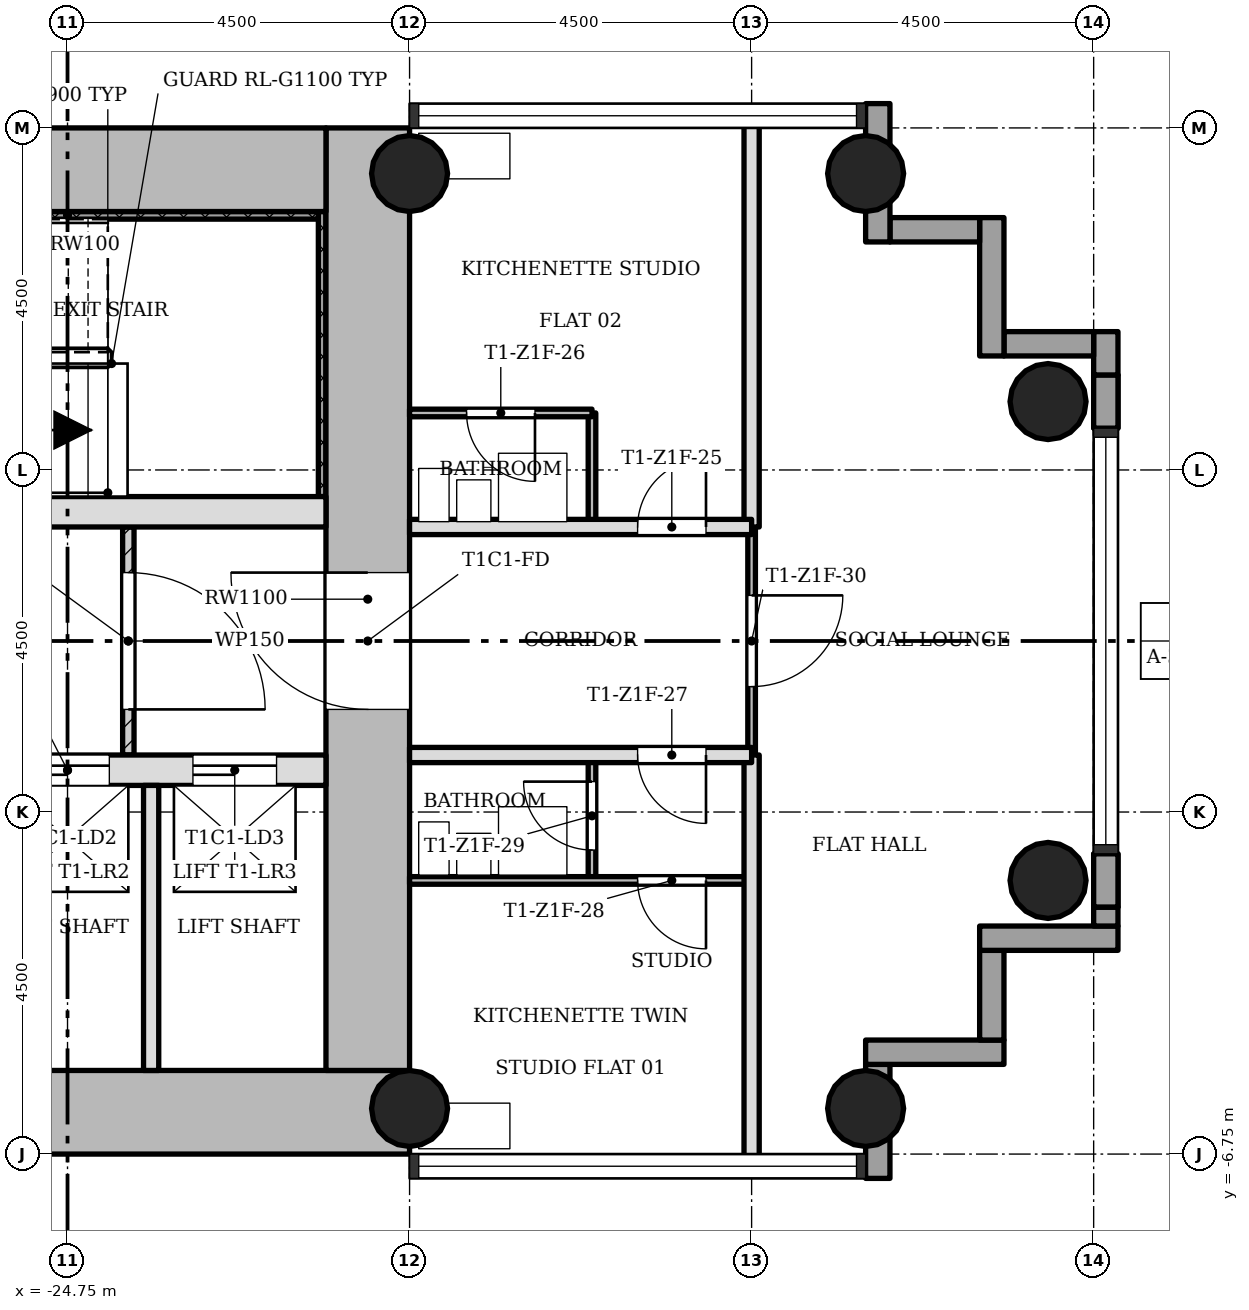
"""IFC4 building model, lengths in metres.
Left out: names, types, materials, properties, quantities, classifications, styles, units other than length and angle.
Written with IfcOpenShell. Run it as: python <this file> out.ifc"""

import sys

from ifc_helpers import new_model, si_unit, direction, frame, frame_2d, origin, origin_2d, place, context, subcontext, project, spatial, rectangle, hollow_circle, extrude, element, fill, save


model = new_model("IFC4")
c1 = context("Model", 3, precision=1e-05, world=origin(), true_north=direction((0.0, 1.0)))
c2 = subcontext(c1, "Body", "Model", "MODEL_VIEW")
j1 = project(units=[si_unit("LENGTHUNIT", "METRE"), si_unit("PLANEANGLEUNIT", "RADIAN")], contexts=[c1])
p1 = place(None, origin())
s1 = spatial("IfcSite", under=j1, at=p1, CompositionType="ELEMENT")
p2 = place(p1, origin())
s2 = spatial("IfcBuilding", under=s1, at=p2, CompositionType="ELEMENT")
p3 = place(p2, frame((0.0, 0.0, 68.7)))
s3 = spatial("IfcBuildingStorey", under=s2, at=p3, CompositionType="ELEMENT", Elevation=68.7)
p4 = place(p3, frame((-28.15, -6.2, 0.0), z_axis=(0.0, 0.0, 1.0), x_axis=(1.0, 0.0, 0.0)))
e1 = element("IfcWall", 1, at=p4, inside=s3, PredefinedType="SHEAR", context=c2, shape_type="SweptSolid", body=[
    extrude(rectangle(XDim=7.9, YDim=1.1, at=frame_2d((3.95, 0.0))), origin(), (0.0, 0.0, 1.0), 3.4),
])
p5 = place(p3, frame((-20.8, -5.65, 0.0), z_axis=(0.0, 0.0, 1.0), x_axis=(0.0, 1.0, 0.0)))
e2 = element("IfcWall", 2, at=p5, inside=s3, PredefinedType="SHEAR", context=c2, shape_type="SweptSolid", body=[
    extrude(rectangle(XDim=12.4, YDim=1.1, at=frame_2d((6.2, 0.0))), origin(), (0.0, 0.0, 1.0), 3.4),
])
p6 = place(p5, frame((4.75, 0.0, 0.0)))
e3 = element("IfcOpeningElement", 3, at=p6, cuts=e2, PredefinedType="OPENING", context=c2, shape_type="SweptSolid", body=[
    extrude(rectangle(XDim=1.8, YDim=2.1, at=frame_2d((0.9, 1.05))), frame((0.0, 0.56, 0.0), z_axis=(0.0, -1.0, 0.0), x_axis=(1.0, 0.0, 0.0)), (0.0, 0.0, 1.0), 1.12),
])
p7 = place(p3, frame((-21.35, 6.2, 0.0), z_axis=(0.0, 0.0, 1.0), x_axis=(-1.0, 0.0, 0.0)))
e4 = element("IfcWall", 4, at=p7, inside=s3, PredefinedType="SHEAR", context=c2, shape_type="SweptSolid", body=[
    extrude(rectangle(XDim=7.998, YDim=1.1, at=frame_2d((3.999, 0.0))), origin(), (0.0, 0.0, 1.0), 3.4),
])
p8 = place(p3, frame((-28.15, -1.7, 0.0), z_axis=(0.0, 0.0, 1.0), x_axis=(1.0, 0.0, 0.0)))
e5 = element("IfcWall", 5, at=p8, inside=s3, PredefinedType="SHEAR", context=c2, shape_type="SweptSolid", body=[
    extrude(rectangle(XDim=6.8, YDim=0.4, at=frame_2d((3.4, 0.0))), origin(), (0.0, 0.0, 1.0), 3.4),
])
p9 = place(p8, frame((0.65, 0.0, 0.0)))
e6 = element("IfcOpeningElement", 6, at=p9, cuts=e5, PredefinedType="OPENING", context=c2, shape_type="SweptSolid", body=[
    extrude(rectangle(XDim=1.1, YDim=2.1, at=frame_2d((0.55, 1.05))), frame((0.0, 0.21, 0.0), z_axis=(0.0, -1.0, 0.0), x_axis=(1.0, 0.0, 0.0)), (0.0, 0.0, 1.0), 0.42),
])
p10 = place(p8, frame((2.85, 0.0, 0.0)))
e7 = element("IfcOpeningElement", 7, at=p10, cuts=e5, PredefinedType="OPENING", context=c2, shape_type="SweptSolid", body=[
    extrude(rectangle(XDim=1.1, YDim=2.1, at=frame_2d((0.55, 1.05))), frame((0.0, 0.21, 0.0), z_axis=(0.0, -1.0, 0.0), x_axis=(1.0, 0.0, 0.0)), (0.0, 0.0, 1.0), 0.42),
])
p11 = place(p8, frame((5.05, 0.0, 0.0)))
e8 = element("IfcOpeningElement", 8, at=p11, cuts=e5, PredefinedType="OPENING", context=c2, shape_type="SweptSolid", body=[
    extrude(rectangle(XDim=1.1, YDim=2.1, at=frame_2d((0.55, 1.05))), frame((0.0, 0.21, 0.0), z_axis=(0.0, -1.0, 0.0), x_axis=(1.0, 0.0, 0.0)), (0.0, 0.0, 1.0), 0.42),
])
p12 = place(p3, frame((-28.15, 1.7, 0.0), z_axis=(0.0, 0.0, 1.0), x_axis=(1.0, 0.0, 0.0)))
e9 = element("IfcWall", 9, at=p12, inside=s3, PredefinedType="SHEAR", context=c2, shape_type="SweptSolid", body=[
    extrude(rectangle(XDim=6.8, YDim=0.4, at=frame_2d((3.4, 0.0))), origin(), (0.0, 0.0, 1.0), 3.4),
])
p13 = place(p12, frame((0.55, 0.0, 0.0)))
e10 = element("IfcOpeningElement", 10, at=p13, cuts=e9, PredefinedType="OPENING", context=c2, shape_type="SweptSolid", body=[
    extrude(rectangle(XDim=0.9, YDim=2.1, at=frame_2d((0.45, 1.05))), frame((0.0, 0.21, 0.0), z_axis=(0.0, -1.0, 0.0), x_axis=(1.0, 0.0, 0.0)), (0.0, 0.0, 1.0), 0.42),
])
for number, where, z_axis, x_axis in (
    (11, (-20.25, -6.15, 0.0), (0.0, 0.0, 1.0), (1.0, 0.0, 0.0)),
    (12, (-20.25, 6.15, 0.0), (0.0, 0.0, 1.0), (1.0, 0.0, 0.0)),
    (13, (-14.25, -6.15, 0.0), (0.0, 0.0, 1.0), (1.0, 0.0, 0.0)),
    (14, (-14.25, 6.15, 0.0), (0.0, 0.0, 1.0), (1.0, 0.0, 0.0)),
    (15, (-11.85, -3.15, 0.0), (0.0, 0.0, 1.0), (1.0, 0.0, 0.0)),
    (16, (-11.85, 3.15, 0.0), (0.0, 0.0, 1.0), (1.0, 0.0, 0.0)),
):
    element("IfcColumn", number, at=place(p3, frame(where, z_axis=z_axis, x_axis=x_axis)), inside=s3, PredefinedType="COLUMN", context=c2, shape_type="SweptSolid", body=[
        extrude(hollow_circle(Radius=0.5, WallThickness=0.036, at=origin_2d()), origin(), (0.0, 0.0, 1.0), 3.4),
    ])
p14 = place(p3, frame((-14.09, -7.07, -0.3), z_axis=(0.0, 0.0, 1.0), x_axis=(0.0, 1.0, 0.0)))
e17 = element("IfcWall", 17, at=p14, inside=s3, PredefinedType="STANDARD", context=c2, shape_type="SweptSolid", body=[
    extrude(rectangle(XDim=1.5, YDim=0.32, at=frame_2d((0.75, 0.0))), origin(), (0.0, 0.0, 1.0), 3.4),
])
p15 = place(p3, frame((-14.25, -5.41, -0.3), z_axis=(0.0, 0.0, 1.0), x_axis=(1.0, 0.0, 0.0)))
e18 = element("IfcWall", 18, at=p15, inside=s3, PredefinedType="STANDARD", context=c2, shape_type="SweptSolid", body=[
    extrude(rectangle(XDim=1.82, YDim=0.32, at=frame_2d((0.91, 0.0))), origin(), (0.0, 0.0, 1.0), 3.4),
])
p16 = place(p3, frame((-12.59, -5.25, -0.3), z_axis=(0.0, 0.0, 1.0), x_axis=(0.0, 1.0, 0.0)))
e19 = element("IfcWall", 19, at=p16, inside=s3, PredefinedType="STANDARD", context=c2, shape_type="SweptSolid", body=[
    extrude(rectangle(XDim=1.18, YDim=0.32, at=frame_2d((0.59, 0.0))), origin(), (0.0, 0.0, 1.0), 3.4),
])
p17 = place(p3, frame((-12.75, -3.91, -0.3), z_axis=(0.0, 0.0, 1.0), x_axis=(1.0, 0.0, 0.0)))
e20 = element("IfcWall", 20, at=p17, inside=s3, PredefinedType="STANDARD", context=c2, shape_type="SweptSolid", body=[
    extrude(rectangle(XDim=1.82, YDim=0.32, at=frame_2d((0.91, 0.0))), origin(), (0.0, 0.0, 1.0), 3.4),
])
p18 = place(p3, frame((-11.09, -3.75, 0.0), z_axis=(0.0, 0.0, 1.0), x_axis=(0.0, 1.0, 0.0)))
e21 = element("IfcWall", 21, at=p18, inside=s3, PredefinedType="STANDARD", context=c2, shape_type="SweptSolid", body=[
    extrude(rectangle(XDim=0.25, YDim=0.32, at=frame_2d((0.125, 0.0))), origin(), (0.0, 0.0, 1.0), 3.1),
])
p19 = place(p3, frame((-11.09, -3.5, 0.0), z_axis=(0.0, 0.0, 1.0), x_axis=(0.0, 1.0, 0.0)))
e22 = element("IfcWall", 22, at=p19, inside=s3, PredefinedType="STANDARD", context=c2, shape_type="SweptSolid", body=[
    extrude(rectangle(XDim=0.7, YDim=0.32, at=frame_2d((0.35, 0.0))), origin(), (0.0, 0.0, 1.0), 2.51),
])
p20 = place(p3, frame((-11.09, -3.5, 2.98), z_axis=(0.0, 0.0, 1.0), x_axis=(0.0, 1.0, 0.0)))
e23 = element("IfcWall", 23, at=p20, inside=s3, PredefinedType="STANDARD", context=c2, shape_type="SweptSolid", body=[
    extrude(rectangle(XDim=0.7, YDim=0.32, at=frame_2d((0.35, 0.0))), origin(), (0.0, 0.0, 1.0), 0.12),
])
p21 = place(p3, frame((-11.09, 2.8, 0.0), z_axis=(0.0, 0.0, 1.0), x_axis=(0.0, 1.0, 0.0)))
e24 = element("IfcWall", 24, at=p21, inside=s3, PredefinedType="STANDARD", context=c2, shape_type="SweptSolid", body=[
    extrude(rectangle(XDim=0.7, YDim=0.32, at=frame_2d((0.35, 0.0))), origin(), (0.0, 0.0, 1.0), 2.51),
])
p22 = place(p3, frame((-11.09, 2.8, 2.98), z_axis=(0.0, 0.0, 1.0), x_axis=(0.0, 1.0, 0.0)))
e25 = element("IfcWall", 25, at=p22, inside=s3, PredefinedType="STANDARD", context=c2, shape_type="SweptSolid", body=[
    extrude(rectangle(XDim=0.7, YDim=0.32, at=frame_2d((0.35, 0.0))), origin(), (0.0, 0.0, 1.0), 0.12),
])
p23 = place(p3, frame((-11.09, 3.5, 0.0), z_axis=(0.0, 0.0, 1.0), x_axis=(0.0, 1.0, 0.0)))
e26 = element("IfcWall", 26, at=p23, inside=s3, PredefinedType="STANDARD", context=c2, shape_type="SweptSolid", body=[
    extrude(rectangle(XDim=0.57, YDim=0.32, at=frame_2d((0.285, 0.0))), origin(), (0.0, 0.0, 1.0), 3.1),
])
p24 = place(p3, frame((-11.25, 3.91, -0.3), z_axis=(0.0, 0.0, 1.0), x_axis=(-1.0, 0.0, 0.0)))
e27 = element("IfcWall", 27, at=p24, inside=s3, PredefinedType="STANDARD", context=c2, shape_type="SweptSolid", body=[
    extrude(rectangle(XDim=1.18, YDim=0.32, at=frame_2d((0.59, 0.0))), origin(), (0.0, 0.0, 1.0), 3.4),
])
p25 = place(p3, frame((-12.59, 3.75, -0.3), z_axis=(0.0, 0.0, 1.0), x_axis=(0.0, 1.0, 0.0)))
e28 = element("IfcWall", 28, at=p25, inside=s3, PredefinedType="STANDARD", context=c2, shape_type="SweptSolid", body=[
    extrude(rectangle(XDim=1.82, YDim=0.32, at=frame_2d((0.91, 0.0))), origin(), (0.0, 0.0, 1.0), 3.4),
])
p26 = place(p3, frame((-12.75, 5.41, -0.3), z_axis=(0.0, 0.0, 1.0), x_axis=(-1.0, 0.0, 0.0)))
e29 = element("IfcWall", 29, at=p26, inside=s3, PredefinedType="STANDARD", context=c2, shape_type="SweptSolid", body=[
    extrude(rectangle(XDim=1.18, YDim=0.32, at=frame_2d((0.59, 0.0))), origin(), (0.0, 0.0, 1.0), 3.4),
])
p27 = place(p3, frame((-14.09, 5.25, -0.3), z_axis=(0.0, 0.0, 1.0), x_axis=(0.0, 1.0, 0.0)))
e30 = element("IfcWall", 30, at=p27, inside=s3, PredefinedType="STANDARD", context=c2, shape_type="SweptSolid", body=[
    extrude(rectangle(XDim=1.82, YDim=0.32, at=frame_2d((0.91, 0.0))), origin(), (0.0, 0.0, 1.0), 3.4),
])
p28 = place(p3, frame((-23.95, -1.5, 0.0), z_axis=(0.0, 0.0, 1.0), x_axis=(0.0, 1.0, 0.0)))
e31 = element("IfcWall", 31, at=p28, inside=s3, PredefinedType="PARTITIONING", context=c2, shape_type="SweptSolid", body=[
    extrude(rectangle(XDim=3.0, YDim=0.15, at=frame_2d((1.5, 0.0))), origin(), (0.0, 0.0, 1.0), 3.0),
])
p29 = place(p28, frame((0.6, 0.0, 0.0)))
e32 = element("IfcOpeningElement", 32, at=p29, cuts=e31, PredefinedType="OPENING", context=c2, shape_type="SweptSolid", body=[
    extrude(rectangle(XDim=1.8, YDim=2.1, at=frame_2d((0.9, 1.05))), frame((0.0, 0.085, 0.0), z_axis=(0.0, -1.0, 0.0), x_axis=(1.0, 0.0, 0.0)), (0.0, 0.0, 1.0), 0.17),
])
p30 = place(p3, frame((-23.65, -5.65, 0.0), z_axis=(0.0, 0.0, 1.0), x_axis=(0.0, 1.0, 0.0)))
e33 = element("IfcWall", 33, at=p30, inside=s3, PredefinedType="SOLIDWALL", context=c2, shape_type="SweptSolid", body=[
    extrude(rectangle(XDim=3.75, YDim=0.2, at=frame_2d((1.875, 0.0))), origin(), (0.0, 0.0, 1.0), 3.0),
])
p31 = place(p3, frame((-17.85, -3.15, 0.0), z_axis=(0.0, 0.0, 1.0), x_axis=(0.0, 1.0, 0.0)))
e34 = element("IfcWall", 34, at=p31, inside=s3, PredefinedType="PARTITIONING", context=c2, shape_type="SweptSolid", body=[
    extrude(rectangle(XDim=1.65, YDim=0.1, at=frame_2d((0.825, 0.0))), origin(), (0.0, 0.0, 1.0), 3.0),
])
p32 = place(p31, frame((0.4, 0.0, 0.0)))
e35 = element("IfcOpeningElement", 35, at=p32, cuts=e34, PredefinedType="OPENING", context=c2, shape_type="SweptSolid", body=[
    extrude(rectangle(XDim=0.9, YDim=2.1, at=frame_2d((0.45, 1.05))), frame((0.0, 0.06, 0.0), z_axis=(0.0, -1.0, 0.0), x_axis=(1.0, 0.0, 0.0)), (0.0, 0.0, 1.0), 0.12),
])
p33 = place(p3, frame((-17.85, 1.5, 0.0), z_axis=(0.0, 0.0, 1.0), x_axis=(0.0, 1.0, 0.0)))
e36 = element("IfcWall", 36, at=p33, inside=s3, PredefinedType="PARTITIONING", context=c2, shape_type="SweptSolid", body=[
    extrude(rectangle(XDim=1.5, YDim=0.1, at=frame_2d((0.75, 0.0))), origin(), (0.0, 0.0, 1.0), 3.0),
])
p34 = place(p3, frame((-15.75, -1.5, 0.0), z_axis=(0.0, 0.0, 1.0), x_axis=(0.0, 1.0, 0.0)))
e37 = element("IfcWall", 37, at=p34, inside=s3, PredefinedType="PARTITIONING", context=c2, shape_type="SweptSolid", body=[
    extrude(rectangle(XDim=3.0, YDim=0.1, at=frame_2d((1.5, 0.0))), origin(), (0.0, 0.0, 1.0), 3.0),
])
p35 = place(p34, frame((0.9, 0.0, 0.0)))
e38 = element("IfcOpeningElement", 38, at=p35, cuts=e37, PredefinedType="OPENING", context=c2, shape_type="SweptSolid", body=[
    extrude(rectangle(XDim=1.2, YDim=2.1, at=frame_2d((0.6, 1.05))), frame((0.0, 0.06, 0.0), z_axis=(0.0, -1.0, 0.0), x_axis=(1.0, 0.0, 0.0)), (0.0, 0.0, 1.0), 0.12),
])
for number, where, z_axis, x_axis in (
    (39, (-15.75, -6.85, 0.0), (0.0, 0.0, 1.0), (0.0, 1.0, 0.0)),
    (40, (-15.75, 1.5, 0.0), (0.0, 0.0, 1.0), (0.0, 1.0, 0.0)),
):
    element("IfcWall", number, at=place(p3, frame(where, z_axis=z_axis, x_axis=x_axis)), inside=s3, PredefinedType="SOLIDWALL", context=c2, shape_type="SweptSolid", body=[
        extrude(rectangle(XDim=5.35, YDim=0.2, at=frame_2d((2.675, 0.0))), origin(), (0.0, 0.0, 1.0), 3.0),
    ])
p36 = place(p3, frame((-20.25, -3.15, 0.0), z_axis=(0.0, 0.0, 1.0), x_axis=(1.0, 0.0, 0.0)))
e41 = element("IfcWall", 41, at=p36, inside=s3, PredefinedType="PARTITIONING", context=c2, shape_type="SweptSolid", body=[
    extrude(rectangle(XDim=4.5, YDim=0.1, at=frame_2d((2.25, 0.0))), origin(), (0.0, 0.0, 1.0), 3.0),
])
p37 = place(p36, frame((3.0, 0.0, 0.0)))
e42 = element("IfcOpeningElement", 42, at=p37, cuts=e41, PredefinedType="OPENING", context=c2, shape_type="SweptSolid", body=[
    extrude(rectangle(XDim=0.9, YDim=2.1, at=frame_2d((0.45, 1.05))), frame((0.0, 0.06, 0.0), z_axis=(0.0, -1.0, 0.0), x_axis=(1.0, 0.0, 0.0)), (0.0, 0.0, 1.0), 0.12),
])
p38 = place(p3, frame((-20.25, -1.5, 0.0), z_axis=(0.0, 0.0, 1.0), x_axis=(1.0, 0.0, 0.0)))
e43 = element("IfcWall", 43, at=p38, inside=s3, PredefinedType="SOLIDWALL", context=c2, shape_type="SweptSolid", body=[
    extrude(rectangle(XDim=4.5, YDim=0.2, at=frame_2d((2.25, 0.0))), origin(), (0.0, 0.0, 1.0), 3.0),
])
p39 = place(p38, frame((3.0, 0.0, 0.0)))
e44 = element("IfcOpeningElement", 44, at=p39, cuts=e43, PredefinedType="OPENING", context=c2, shape_type="SweptSolid", body=[
    extrude(rectangle(XDim=0.9, YDim=2.1, at=frame_2d((0.45, 1.05))), frame((0.0, 0.11, 0.0), z_axis=(0.0, -1.0, 0.0), x_axis=(1.0, 0.0, 0.0)), (0.0, 0.0, 1.0), 0.22),
])
p40 = place(p3, frame((-20.25, 1.5, 0.0), z_axis=(0.0, 0.0, 1.0), x_axis=(1.0, 0.0, 0.0)))
e45 = element("IfcWall", 45, at=p40, inside=s3, PredefinedType="SOLIDWALL", context=c2, shape_type="SweptSolid", body=[
    extrude(rectangle(XDim=4.5, YDim=0.2, at=frame_2d((2.25, 0.0))), origin(), (0.0, 0.0, 1.0), 3.0),
])
p41 = place(p40, frame((3.0, 0.0, 0.0)))
e46 = element("IfcOpeningElement", 46, at=p41, cuts=e45, PredefinedType="OPENING", context=c2, shape_type="SweptSolid", body=[
    extrude(rectangle(XDim=0.9, YDim=2.1, at=frame_2d((0.45, 1.05))), frame((0.0, 0.11, 0.0), z_axis=(0.0, -1.0, 0.0), x_axis=(1.0, 0.0, 0.0)), (0.0, 0.0, 1.0), 0.22),
])
p42 = place(p3, frame((-20.25, 3.0, 0.0), z_axis=(0.0, 0.0, 1.0), x_axis=(1.0, 0.0, 0.0)))
e47 = element("IfcWall", 47, at=p42, inside=s3, PredefinedType="PARTITIONING", context=c2, shape_type="SweptSolid", body=[
    extrude(rectangle(XDim=2.4, YDim=0.1, at=frame_2d((1.2, 0.0))), origin(), (0.0, 0.0, 1.0), 3.0),
])
p43 = place(p42, frame((0.75, 0.0, 0.0)))
e48 = element("IfcOpeningElement", 48, at=p43, cuts=e47, PredefinedType="OPENING", context=c2, shape_type="SweptSolid", body=[
    extrude(rectangle(XDim=0.9, YDim=2.1, at=frame_2d((0.45, 1.05))), frame((0.0, 0.06, 0.0), z_axis=(0.0, -1.0, 0.0), x_axis=(1.0, 0.0, 0.0)), (0.0, 0.0, 1.0), 0.12),
])
p44 = place(p3, frame((-21.4, 1.9, 0.0), z_axis=(0.0, 0.0, 1.0), x_axis=(0.0, 1.0, 0.0)))
e49 = element("IfcWall", 49, at=p44, inside=s3, PredefinedType="SHEAR", context=c2, shape_type="SweptSolid", body=[
    extrude(rectangle(XDim=3.75, YDim=0.1, at=frame_2d((1.875, 0.0))), origin(), (0.0, 0.0, 1.0), 3.4),
])
p45 = place(p3, frame((-28.05, 5.6, 0.0), z_axis=(0.0, 0.0, 1.0), x_axis=(1.0, 0.0, 0.0)))
e50 = element("IfcWall", 50, at=p45, inside=s3, PredefinedType="SHEAR", context=c2, shape_type="SweptSolid", body=[
    extrude(rectangle(XDim=6.6, YDim=0.1, at=frame_2d((3.3, 0.0))), origin(), (0.0, 0.0, 1.0), 3.4),
])
p46 = place(p29, origin())
e51 = element("IfcDoor", 51, at=p46, inside=s3, OperationType="SINGLE_SWING_LEFT", PredefinedType="DOOR", context=c2, shape_type="SweptSolid", body=[
    extrude(rectangle(XDim=1.8, YDim=2.1, at=frame_2d((0.9, 1.05))), frame((0.0, 0.025, 0.0), z_axis=(0.0, -1.0, 0.0), x_axis=(1.0, 0.0, 0.0)), (0.0, 0.0, 1.0), 0.05),
])
fill(e32, e51)
p47 = place(p41, origin())
e52 = element("IfcDoor", 52, at=p47, inside=s3, OperationType="SINGLE_SWING_LEFT", PredefinedType="DOOR", context=c2, shape_type="SweptSolid", body=[
    extrude(rectangle(XDim=0.9, YDim=2.1, at=frame_2d((0.45, 1.05))), frame((0.0, 0.025, 0.0), z_axis=(0.0, -1.0, 0.0), x_axis=(1.0, 0.0, 0.0)), (0.0, 0.0, 1.0), 0.05),
])
fill(e46, e52)
p48 = place(p43, origin())
e53 = element("IfcDoor", 53, at=p48, inside=s3, OperationType="SINGLE_SWING_RIGHT", PredefinedType="DOOR", context=c2, shape_type="SweptSolid", body=[
    extrude(rectangle(XDim=0.9, YDim=2.1, at=frame_2d((0.45, 1.05))), frame((0.0, 0.025, 0.0), z_axis=(0.0, -1.0, 0.0), x_axis=(1.0, 0.0, 0.0)), (0.0, 0.0, 1.0), 0.05),
])
fill(e48, e53)
p49 = place(p39, origin())
e54 = element("IfcDoor", 54, at=p49, inside=s3, OperationType="SINGLE_SWING_RIGHT", PredefinedType="DOOR", context=c2, shape_type="SweptSolid", body=[
    extrude(rectangle(XDim=0.9, YDim=2.1, at=frame_2d((0.45, 1.05))), frame((0.0, 0.025, 0.0), z_axis=(0.0, -1.0, 0.0), x_axis=(1.0, 0.0, 0.0)), (0.0, 0.0, 1.0), 0.05),
])
fill(e44, e54)
p50 = place(p37, origin())
e55 = element("IfcDoor", 55, at=p50, inside=s3, OperationType="SINGLE_SWING_RIGHT", PredefinedType="DOOR", context=c2, shape_type="SweptSolid", body=[
    extrude(rectangle(XDim=0.9, YDim=2.1, at=frame_2d((0.45, 1.05))), frame((0.0, 0.025, 0.0), z_axis=(0.0, -1.0, 0.0), x_axis=(1.0, 0.0, 0.0)), (0.0, 0.0, 1.0), 0.05),
])
fill(e42, e55)
p51 = place(p32, origin())
e56 = element("IfcDoor", 56, at=p51, inside=s3, OperationType="SINGLE_SWING_LEFT", PredefinedType="DOOR", context=c2, shape_type="SweptSolid", body=[
    extrude(rectangle(XDim=0.9, YDim=2.1, at=frame_2d((0.45, 1.05))), frame((0.0, 0.025, 0.0), z_axis=(0.0, -1.0, 0.0), x_axis=(1.0, 0.0, 0.0)), (0.0, 0.0, 1.0), 0.05),
])
fill(e35, e56)
p52 = place(p35, origin())
e57 = element("IfcDoor", 57, at=p52, inside=s3, OperationType="SINGLE_SWING_RIGHT", PredefinedType="DOOR", context=c2, shape_type="SweptSolid", body=[
    extrude(rectangle(XDim=1.2, YDim=2.1, at=frame_2d((0.6, 1.05))), frame((0.0, 0.025, 0.0), z_axis=(0.0, -1.0, 0.0), x_axis=(1.0, 0.0, 0.0)), (0.0, 0.0, 1.0), 0.05),
])
fill(e38, e57)
p53 = place(p10, origin())
e58 = element("IfcDoor", 58, at=p53, inside=s3, OperationType="SLIDING_TO_LEFT", PredefinedType="DOOR", context=c2, shape_type="SweptSolid", body=[
    extrude(rectangle(XDim=1.1, YDim=2.1, at=frame_2d((0.55, 1.05))), frame((0.0, 0.025, 0.0), z_axis=(0.0, -1.0, 0.0), x_axis=(1.0, 0.0, 0.0)), (0.0, 0.0, 1.0), 0.05),
])
fill(e7, e58)
p54 = place(p11, origin())
e59 = element("IfcDoor", 59, at=p54, inside=s3, OperationType="SLIDING_TO_LEFT", PredefinedType="DOOR", context=c2, shape_type="SweptSolid", body=[
    extrude(rectangle(XDim=1.1, YDim=2.1, at=frame_2d((0.55, 1.05))), frame((0.0, 0.025, 0.0), z_axis=(0.0, -1.0, 0.0), x_axis=(1.0, 0.0, 0.0)), (0.0, 0.0, 1.0), 0.05),
])
fill(e8, e59)
p55 = place(p6, origin())
e60 = element("IfcDoor", 60, at=p55, inside=s3, OperationType="SINGLE_SWING_LEFT", PredefinedType="DOOR", context=c2, shape_type="SweptSolid", body=[
    extrude(rectangle(XDim=1.8, YDim=2.1, at=frame_2d((0.9, 1.05))), frame((0.0, 0.025, 0.0), z_axis=(0.0, -1.0, 0.0), x_axis=(1.0, 0.0, 0.0)), (0.0, 0.0, 1.0), 0.05),
])
fill(e3, e60)
save(model, sys.argv[1])
